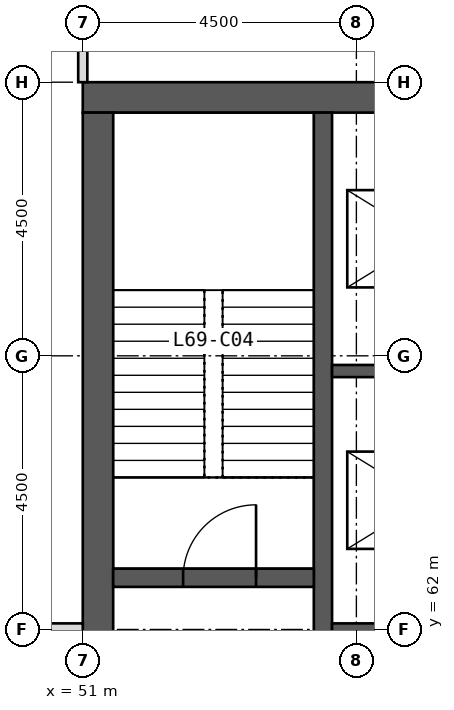
"""IFC4 building model, lengths in metres.
Left out: names, types, materials, properties, quantities, classifications, styles, units other than length and angle.
Written with IfcOpenShell. Run it as: python <this file> out.ifc"""

import sys

from ifc_helpers import new_model, si_unit, direction, frame, frame_2d, origin, place, context, subcontext, project, spatial, rectangle, extrude, element, fill, save


model = new_model("IFC4")
c1 = context("Model", 3, precision=1e-05, world=origin(), true_north=direction((0.0, 1.0)))
c2 = subcontext(c1, "Body", "Model", "MODEL_VIEW")
j1 = project(units=[si_unit("LENGTHUNIT", "METRE"), si_unit("PLANEANGLEUNIT", "RADIAN")], contexts=[c1])
p1 = place(None, origin())
s1 = spatial("IfcSite", under=j1, at=p1, CompositionType="ELEMENT")
p2 = place(p1, origin())
s2 = spatial("IfcBuilding", under=s1, at=p2, CompositionType="ELEMENT")
p3 = place(p2, frame((0.0, 0.0, 286.0)))
s3 = spatial("IfcBuildingStorey", under=s2, at=p3, CompositionType="ELEMENT", Elevation=286.0)
p4 = place(p3, frame((51.0, 70.75, 0.0), z_axis=(0.0, 0.0, 1.0), x_axis=(1.0, 0.0, 0.0)))
e1 = element("IfcWall", 1, at=p4, inside=s3, PredefinedType="SHEAR", context=c2, shape_type="SweptSolid", body=[
    extrude(rectangle(XDim=18.0, YDim=0.5, at=frame_2d((9.0, 0.0))), origin(), (0.0, 0.0, 1.0), 4.0),
])
p5 = place(p4, frame((8.1, 0.0, 0.0)))
e2 = element("IfcOpeningElement", 2, at=p5, cuts=e1, PredefinedType="OPENING", context=c2, shape_type="SweptSolid", body=[
    extrude(rectangle(XDim=1.8, YDim=2.2, at=frame_2d((0.9, 1.1))), frame((0.0, 0.26, 0.0), z_axis=(0.0, -1.0, 0.0), x_axis=(1.0, 0.0, 0.0)), (0.0, 0.0, 1.0), 0.52),
])
p6 = place(p3, frame((51.25, 53.5, 0.0), z_axis=(0.0, 0.0, 1.0), x_axis=(0.0, 1.0, 0.0)))
e3 = element("IfcWall", 3, at=p6, inside=s3, PredefinedType="SHEAR", context=c2, shape_type="SweptSolid", body=[
    extrude(rectangle(XDim=17.0, YDim=0.5, at=frame_2d((8.5, 0.0))), origin(), (0.0, 0.0, 1.0), 4.0),
])
p7 = place(p6, frame((6.1, 0.0, 0.0)))
e4 = element("IfcOpeningElement", 4, at=p7, cuts=e3, PredefinedType="OPENING", context=c2, shape_type="SweptSolid", body=[
    extrude(rectangle(XDim=1.5, YDim=2.2, at=frame_2d((0.75, 1.1))), frame((0.0, 0.26, 0.0), z_axis=(0.0, -1.0, 0.0), x_axis=(1.0, 0.0, 0.0)), (0.0, 0.0, 1.0), 0.52),
])
p8 = place(p3, frame((54.95, 53.5, 0.0), z_axis=(0.0, 0.0, 1.0), x_axis=(0.0, 1.0, 0.0)))
e5 = element("IfcWall", 5, at=p8, inside=s3, PredefinedType="SHEAR", context=c2, shape_type="SweptSolid", body=[
    extrude(rectangle(XDim=17.0, YDim=0.3, at=frame_2d((8.5, 0.0))), origin(), (0.0, 0.0, 1.0), 4.0),
])
for number, where, z_axis, x_axis in (
    (6, (55.1, 62.0, 0.0), (0.0, 0.0, 1.0), (1.0, 0.0, 0.0)),
    (7, (55.1, 66.25, 0.0), (0.0, 0.0, 1.0), (1.0, 0.0, 0.0)),
):
    element("IfcWall", number, at=place(p3, frame(where, z_axis=z_axis, x_axis=x_axis)), inside=s3, PredefinedType="SHEAR", context=c2, shape_type="SweptSolid", body=[
        extrude(rectangle(XDim=3.05, YDim=0.2, at=frame_2d((1.525, 0.0))), origin(), (0.0, 0.0, 1.0), 4.0),
    ])
p9 = place(p3, frame((51.5, 62.85, 0.0), z_axis=(0.0, 0.0, 1.0), x_axis=(1.0, 0.0, 0.0)))
e8 = element("IfcWall", 8, at=p9, inside=s3, PredefinedType="SHEAR", context=c2, shape_type="SweptSolid", body=[
    extrude(rectangle(XDim=3.3, YDim=0.3, at=frame_2d((1.65, 0.0))), origin(), (0.0, 0.0, 1.0), 4.0),
])
p10 = place(p9, frame((1.15, 0.0, 0.0)))
e9 = element("IfcOpeningElement", 9, at=p10, cuts=e8, PredefinedType="OPENING", context=c2, shape_type="SweptSolid", body=[
    extrude(rectangle(XDim=1.2, YDim=2.1, at=frame_2d((0.6, 1.05))), frame((0.0, 0.16, 0.0), z_axis=(0.0, -1.0, 0.0), x_axis=(1.0, 0.0, 0.0)), (0.0, 0.0, 1.0), 0.32),
])
p11 = place(p3, frame((51.0, 71.0, 0.0), z_axis=(0.0, 0.0, 1.0), x_axis=(0.0, 1.0, 0.0)))
e10 = element("IfcWall", 10, at=p11, inside=s3, PredefinedType="PARTITIONING", context=c2, shape_type="SweptSolid", body=[
    extrude(rectangle(XDim=1.5, YDim=0.15, at=frame_2d((0.75, 0.0))), origin(), (0.0, 0.0, 1.0), 3.75),
])
p12 = place(p3, frame((51.0, 62.0, 0.0), z_axis=(0.0, 0.0, 1.0), x_axis=(-1.0, 0.0, 0.0)))
e11 = element("IfcWall", 11, at=p12, inside=s3, PredefinedType="SOLIDWALL", context=c2, shape_type="SweptSolid", body=[
    extrude(rectangle(XDim=1.5, YDim=0.2, at=frame_2d((0.75, 0.0))), origin(), (0.0, 0.0, 1.0), 2.997),
])
p13 = place(p10, origin())
e12 = element("IfcDoor", 12, at=p13, inside=s3, OperationType="SINGLE_SWING_RIGHT", PredefinedType="DOOR", context=c2, shape_type="SweptSolid", body=[
    extrude(rectangle(XDim=1.2, YDim=2.1, at=frame_2d((0.6, 1.05))), frame((0.0, 0.025, 0.0), z_axis=(0.0, -1.0, 0.0), x_axis=(1.0, 0.0, 0.0)), (0.0, 0.0, 1.0), 0.05),
])
fill(e9, e12)
save(model, sys.argv[1])
